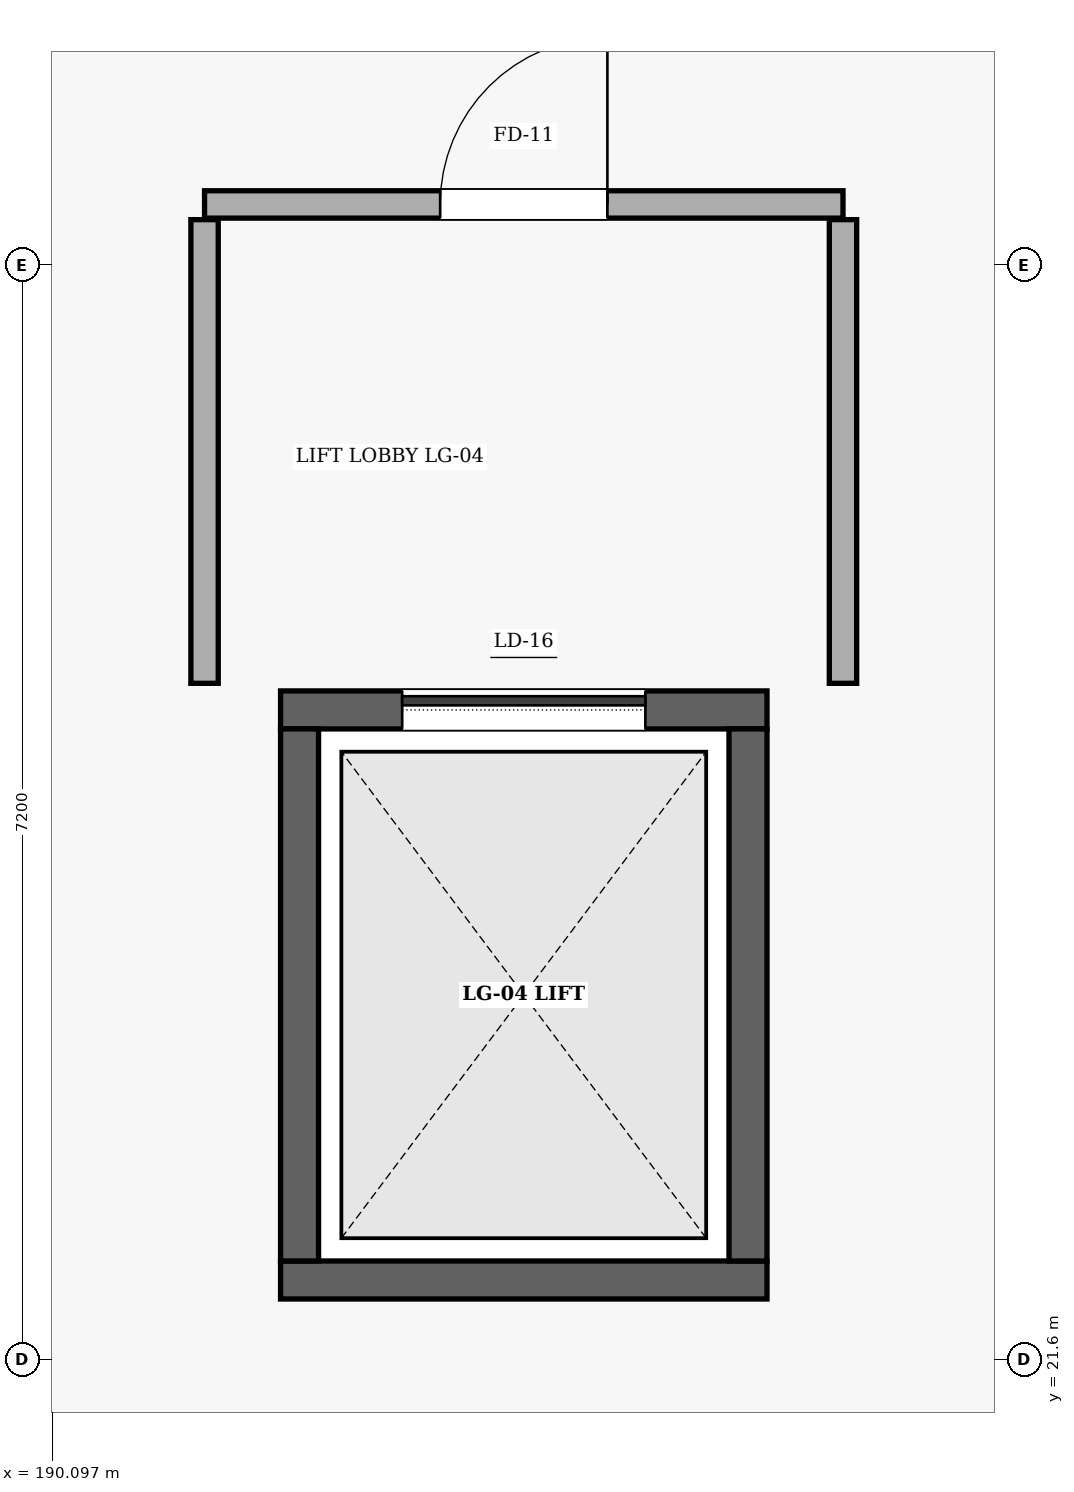
"""IFC4 building model, lengths in metres.
Left out: names, types, materials, properties, quantities, classifications, styles, units other than length and angle.
Written with IfcOpenShell. Run it as: python <this file> out.ifc"""

import sys

from ifc_helpers import new_model, si_unit, direction, frame, frame_2d, origin, place, context, subcontext, project, spatial, rectangle, extrude, element, fill, save


model = new_model("IFC4")
c1 = context("Model", 3, precision=1e-05, world=origin(), true_north=direction((0.0, 1.0)))
c2 = subcontext(c1, "Body", "Model", "MODEL_VIEW")
j1 = project(units=[si_unit("LENGTHUNIT", "METRE"), si_unit("PLANEANGLEUNIT", "RADIAN")], contexts=[c1])
p1 = place(None, origin())
s1 = spatial("IfcSite", under=j1, at=p1, CompositionType="ELEMENT")
p2 = place(p1, origin())
s2 = spatial("IfcBuilding", under=s1, at=p2, CompositionType="ELEMENT")
p3 = place(p2, origin())
s3 = spatial("IfcBuildingStorey", under=s2, at=p3, CompositionType="ELEMENT", Elevation=0.0)
p4 = place(p3, frame((191.6, 22.125, 0.0), z_axis=(0.0, 0.0, 1.0), x_axis=(1.0, 0.0, 0.0)))
e1 = element("IfcWall", 1, at=p4, inside=s3, PredefinedType="SHEAR", context=c2, shape_type="SweptSolid", body=[
    extrude(rectangle(XDim=3.2, YDim=0.25, at=frame_2d((1.6, 0.0))), origin(), (0.0, 0.0, 1.0), 5.12),
])
p5 = place(p3, frame((191.6, 25.875, 0.0), z_axis=(0.0, 0.0, 1.0), x_axis=(1.0, 0.0, 0.0)))
e2 = element("IfcWall", 2, at=p5, inside=s3, PredefinedType="SHEAR", context=c2, shape_type="SweptSolid", body=[
    extrude(rectangle(XDim=3.2, YDim=0.25, at=frame_2d((1.6, 0.0))), origin(), (0.0, 0.0, 1.0), 5.12),
])
p6 = place(p5, frame((0.8, 0.0, 0.0)))
e3 = element("IfcOpeningElement", 3, at=p6, cuts=e2, PredefinedType="OPENING", context=c2, shape_type="SweptSolid", body=[
    extrude(rectangle(XDim=1.6, YDim=2.2, at=frame_2d((0.8, 1.1))), frame((0.0, 0.135, 0.0), z_axis=(0.0, -1.0, 0.0), x_axis=(1.0, 0.0, 0.0)), (0.0, 0.0, 1.0), 0.27),
])
for number, where, z_axis, x_axis in (
    (4, (191.725, 22.25, 0.0), (0.0, 0.0, 1.0), (0.0, 1.0, 0.0)),
    (5, (194.675, 22.25, 0.0), (0.0, 0.0, 1.0), (0.0, 1.0, 0.0)),
):
    element("IfcWall", number, at=place(p3, frame(where, z_axis=z_axis, x_axis=x_axis)), inside=s3, PredefinedType="SHEAR", context=c2, shape_type="SweptSolid", body=[
        extrude(rectangle(XDim=3.5, YDim=0.25, at=frame_2d((1.75, 0.0))), origin(), (0.0, 0.0, 1.0), 5.12),
    ])
p7 = place(p3, frame((191.1, 29.2, 0.0), z_axis=(0.0, 0.0, 1.0), x_axis=(1.0, 0.0, 0.0)))
e6 = element("IfcWall", 6, at=p7, inside=s3, PredefinedType="PARTITIONING", context=c2, shape_type="SweptSolid", body=[
    extrude(rectangle(XDim=4.2, YDim=0.18, at=frame_2d((2.1, 0.0))), origin(), (0.0, 0.0, 1.0), 4.605),
])
p8 = place(p7, frame((1.55, 0.0, 0.0)))
e7 = element("IfcOpeningElement", 7, at=p8, cuts=e6, PredefinedType="OPENING", context=c2, shape_type="SweptSolid", body=[
    extrude(rectangle(XDim=1.1, YDim=2.15, at=frame_2d((0.55, 1.075))), frame((0.0, 0.1, 0.0), z_axis=(0.0, -1.0, 0.0), x_axis=(1.0, 0.0, 0.0)), (0.0, 0.0, 1.0), 0.2),
])
for number, where, z_axis, x_axis in (
    (8, (191.1, 26.05, 0.0), (0.0, 0.0, 1.0), (0.0, 1.0, 0.0)),
    (9, (195.3, 26.05, 0.0), (0.0, 0.0, 1.0), (0.0, 1.0, 0.0)),
):
    element("IfcWall", number, at=place(p3, frame(where, z_axis=z_axis, x_axis=x_axis)), inside=s3, PredefinedType="PARTITIONING", context=c2, shape_type="SweptSolid", body=[
        extrude(rectangle(XDim=3.05, YDim=0.18, at=frame_2d((1.525, 0.0))), origin(), (0.0, 0.0, 1.0), 4.205),
    ])
p9 = place(p6, origin())
e10 = element("IfcDoor", 10, at=p9, inside=s3, OperationType="SLIDING_TO_RIGHT", PredefinedType="DOOR", context=c2, shape_type="SweptSolid", body=[
    extrude(rectangle(XDim=1.6, YDim=2.2, at=frame_2d((0.8, 1.1))), frame((0.0, 0.025, 0.0), z_axis=(0.0, -1.0, 0.0), x_axis=(1.0, 0.0, 0.0)), (0.0, 0.0, 1.0), 0.05),
])
fill(e3, e10)
p10 = place(p8, origin())
e11 = element("IfcDoor", 11, at=p10, inside=s3, OperationType="SINGLE_SWING_RIGHT", PredefinedType="DOOR", context=c2, shape_type="SweptSolid", body=[
    extrude(rectangle(XDim=1.1, YDim=2.15, at=frame_2d((0.55, 1.075))), frame((0.0, 0.025, 0.0), z_axis=(0.0, -1.0, 0.0), x_axis=(1.0, 0.0, 0.0)), (0.0, 0.0, 1.0), 0.05),
])
fill(e7, e11)
save(model, sys.argv[1])
